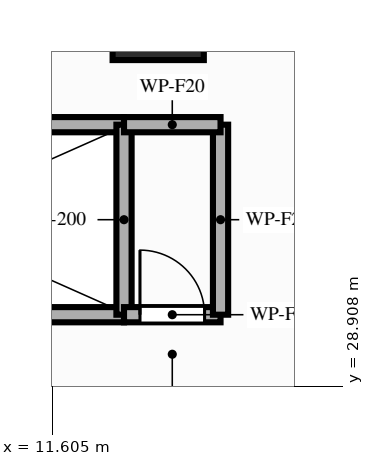
"""IFC4 building model, lengths in metres.
Left out: names, types, materials, properties, quantities, classifications, styles, units other than length and angle.
Written with IfcOpenShell. Run it as: python <this file> out.ifc"""

import sys

from ifc_helpers import new_model, si_unit, direction, frame, frame_2d, origin, origin_2d, place, context, subcontext, project, spatial, rectangle, extrude, element, fill, save


model = new_model("IFC4")
c1 = context("Model", 3, precision=1e-05, world=origin(), true_north=direction((0.0, 1.0)))
c2 = subcontext(c1, "Body", "Model", "MODEL_VIEW")
j1 = project(units=[si_unit("LENGTHUNIT", "METRE"), si_unit("PLANEANGLEUNIT", "RADIAN")], contexts=[c1])
p1 = place(None, origin())
s1 = spatial("IfcSite", under=j1, at=p1, CompositionType="ELEMENT")
p2 = place(p1, origin())
s2 = spatial("IfcBuilding", under=s1, at=p2, CompositionType="ELEMENT")
p3 = place(p2, frame((0.0, 0.0, 69.2)))
s3 = spatial("IfcBuildingStorey", under=s2, at=p3, CompositionType="ELEMENT", Elevation=69.2)
p4 = place(p3, frame((13.0, 33.8, 0.0), z_axis=(0.0, 0.0, 1.0), x_axis=(1.0, 0.0, 0.0)))
e1 = element("IfcColumn", 1, at=p4, inside=s3, PredefinedType="COLUMN", context=c2, shape_type="SweptSolid", body=[
    extrude(rectangle(XDim=1.2, YDim=1.2, at=origin_2d()), origin(), (0.0, 0.0, 1.0), 3.2),
])
for number, where, z_axis, x_axis in (
    (2, (7.0, 29.85, 0.0), (0.0, 0.0, 1.0), (1.0, 0.0, 0.0)),
    (3, (7.0, 32.35, 0.0), (0.0, 0.0, 1.0), (1.0, 0.0, 0.0)),
):
    element("IfcWall", number, at=place(p3, frame(where, z_axis=z_axis, x_axis=x_axis)), inside=s3, PredefinedType="MOVABLE", context=c2, shape_type="SweptSolid", body=[
        extrude(rectangle(XDim=5.55, YDim=0.2, at=frame_2d((2.775, 0.0))), origin(), (0.0, 0.0, 1.0), 3.02),
    ])
p5 = place(p3, frame((12.55, 29.85, 0.0), z_axis=(0.0, 0.0, 1.0), x_axis=(0.0, 1.0, 0.0)))
e4 = element("IfcWall", 4, at=p5, inside=s3, PredefinedType="MOVABLE", context=c2, shape_type="SweptSolid", body=[
    extrude(rectangle(XDim=2.5, YDim=0.2, at=frame_2d((1.25, 0.0))), origin(), (0.0, 0.0, 1.0), 3.02),
])
p6 = place(p3, frame((12.55, 29.85, 0.0), z_axis=(0.0, 0.0, 1.0), x_axis=(1.0, 0.0, 0.0)))
e5 = element("IfcWall", 5, at=p6, inside=s3, PredefinedType="PARTITIONING", context=c2, shape_type="SweptSolid", body=[
    extrude(rectangle(XDim=1.27, YDim=0.2, at=frame_2d((0.635, 0.0))), origin(), (0.0, 0.0, 1.0), 3.02),
])
p7 = place(p6, frame((0.21, 0.0, 0.0)))
e6 = element("IfcOpeningElement", 6, at=p7, cuts=e5, PredefinedType="OPENING", context=c2, shape_type="SweptSolid", body=[
    extrude(rectangle(XDim=0.85, YDim=2.05, at=frame_2d((0.425, 1.025))), frame((0.0, 0.11, 0.0), z_axis=(0.0, -1.0, 0.0), x_axis=(1.0, 0.0, 0.0)), (0.0, 0.0, 1.0), 0.22),
])
p8 = place(p3, frame((13.82, 29.85, 0.0), z_axis=(0.0, 0.0, 1.0), x_axis=(0.0, 1.0, 0.0)))
e7 = element("IfcWall", 7, at=p8, inside=s3, PredefinedType="PARTITIONING", context=c2, shape_type="SweptSolid", body=[
    extrude(rectangle(XDim=2.5, YDim=0.2, at=frame_2d((1.25, 0.0))), origin(), (0.0, 0.0, 1.0), 3.02),
])
p9 = place(p3, frame((12.55, 32.35, 0.0), z_axis=(0.0, 0.0, 1.0), x_axis=(1.0, 0.0, 0.0)))
e8 = element("IfcWall", 8, at=p9, inside=s3, PredefinedType="PARTITIONING", context=c2, shape_type="SweptSolid", body=[
    extrude(rectangle(XDim=1.27, YDim=0.2, at=frame_2d((0.635, 0.0))), origin(), (0.0, 0.0, 1.0), 3.02),
])
p10 = place(p7, origin())
e9 = element("IfcDoor", 9, at=p10, inside=s3, OperationType="SINGLE_SWING_LEFT", PredefinedType="DOOR", context=c2, shape_type="SweptSolid", body=[
    extrude(rectangle(XDim=0.85, YDim=2.05, at=frame_2d((0.425, 1.025))), frame((0.0, 0.025, 0.0), z_axis=(0.0, -1.0, 0.0), x_axis=(1.0, 0.0, 0.0)), (0.0, 0.0, 1.0), 0.05),
])
fill(e6, e9)
save(model, sys.argv[1])
